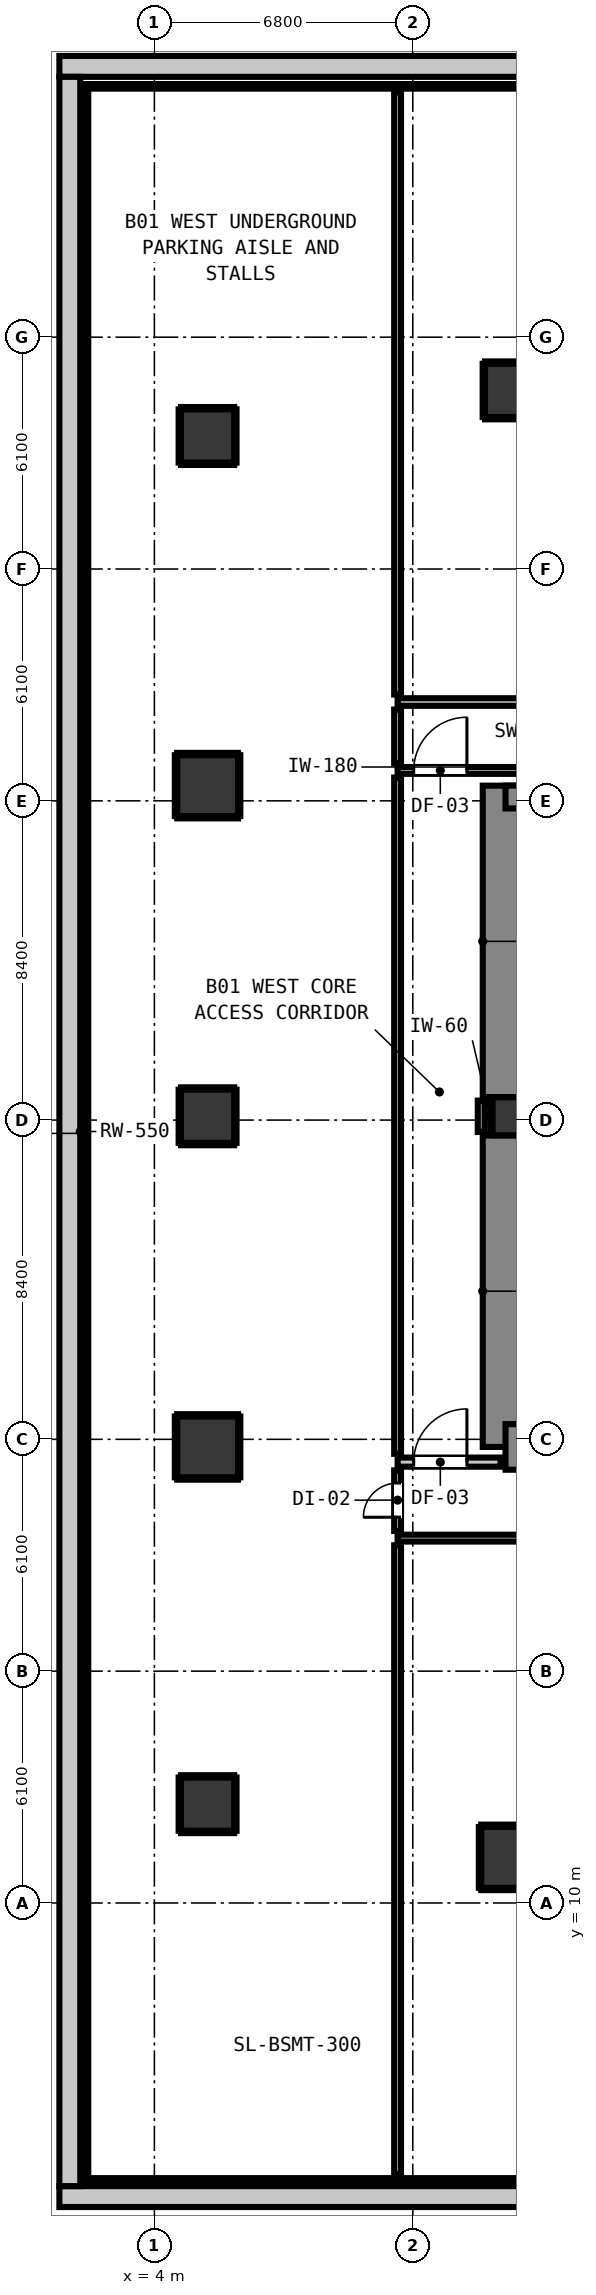
"""IFC4 building model, lengths in metres.
Left out: names, types, materials, properties, quantities, classifications, styles, units other than length and angle.
Written with IfcOpenShell. Run it as: python <this file> out.ifc"""

import sys

from ifc_helpers import new_model, si_unit, direction, frame, frame_2d, origin, origin_2d, place, context, subcontext, project, spatial, rectangle, extrude, element, fill, save


model = new_model("IFC4")
c1 = context("Model", 3, precision=1e-05, world=origin(), true_north=direction((0.0, 1.0)))
c2 = subcontext(c1, "Body", "Model", "MODEL_VIEW")
j1 = project(units=[si_unit("LENGTHUNIT", "METRE"), si_unit("PLANEANGLEUNIT", "RADIAN")], contexts=[c1])
p1 = place(None, origin())
s1 = spatial("IfcSite", under=j1, at=p1, CompositionType="ELEMENT")
p2 = place(p1, origin())
s2 = spatial("IfcBuilding", under=s1, at=p2, CompositionType="ELEMENT")
p3 = place(p2, frame((0.0, 0.0, -4.4)))
s3 = spatial("IfcBuildingStorey", under=s2, at=p3, CompositionType="ELEMENT", Elevation=-4.4)
for number, where, z_axis, x_axis in (
    (1, (1.5, 2.275, 0.0), (0.0, 0.0, 1.0), (1.0, 0.0, 0.0)),
    (2, (85.0, 58.325, 0.0), (0.0, 0.0, 1.0), (-1.0, 0.0, 0.0)),
):
    element("IfcWall", number, at=place(p3, frame(where, z_axis=z_axis, x_axis=x_axis)), inside=s3, PredefinedType="SOLIDWALL", context=c2, shape_type="SweptSolid", body=[
        extrude(rectangle(XDim=83.5, YDim=0.55, at=frame_2d((41.75, 0.0))), origin(), (0.0, 0.0, 1.0), 4.4),
    ])
p4 = place(p3, frame((1.775, 58.05, 0.0), z_axis=(0.0, 0.0, 1.0), x_axis=(0.0, -1.0, 0.0)))
e3 = element("IfcWall", 3, at=p4, inside=s3, PredefinedType="SOLIDWALL", context=c2, shape_type="SweptSolid", body=[
    extrude(rectangle(XDim=55.5, YDim=0.55, at=frame_2d((27.75, 0.0))), origin(), (0.0, 0.0, 1.0), 4.4),
])
p5 = place(p3, frame((13.4, 30.7, 0.0), z_axis=(0.0, 0.0, 1.0), x_axis=(1.0, 0.0, 0.0)))
e4 = element("IfcColumn", 4, at=p5, inside=s3, PredefinedType="COLUMN", context=c2, shape_type="SweptSolid", body=[
    extrude(rectangle(XDim=1.0, YDim=1.0, at=origin_2d()), origin(), (0.0, 0.0, 1.0), 4.4),
])
p6 = place(p3, frame((13.24, 22.0, 0.0), z_axis=(0.0, 0.0, 1.0), x_axis=(0.0, 1.0, 0.0)))
e5 = element("IfcWall", 5, at=p6, inside=s3, PredefinedType="SHEAR", context=c2, shape_type="SweptSolid", body=[
    extrude(rectangle(XDim=8.195, YDim=1.2, at=frame_2d((4.098, 0.0))), origin(), (0.0, 0.0, 1.0), 4.4),
])
p7 = place(p3, frame((13.24, 31.205, 0.0), z_axis=(0.0, 0.0, 1.0), x_axis=(0.0, 1.0, 0.0)))
e6 = element("IfcWall", 6, at=p7, inside=s3, PredefinedType="SHEAR", context=c2, shape_type="SweptSolid", body=[
    extrude(rectangle(XDim=8.195, YDim=1.2, at=frame_2d((4.097, 0.0))), origin(), (0.0, 0.0, 1.0), 4.4),
])
p8 = place(p3, frame((13.24, 22.0, 0.0), z_axis=(0.0, 0.0, 1.0), x_axis=(1.0, 0.0, 0.0)))
e7 = element("IfcWall", 7, at=p8, inside=s3, PredefinedType="SHEAR", context=c2, shape_type="SweptSolid", body=[
    extrude(rectangle(XDim=4.08, YDim=1.2, at=frame_2d((2.04, 0.0))), origin(), (0.0, 0.0, 1.0), 4.4),
])
p9 = place(p3, frame((13.24, 39.1, 0.0), z_axis=(0.0, 0.0, 1.0), x_axis=(1.0, 0.0, 0.0)))
e8 = element("IfcWall", 8, at=p9, inside=s3, PredefinedType="SHEAR", context=c2, shape_type="SweptSolid", body=[
    extrude(rectangle(XDim=4.08, YDim=0.6, at=frame_2d((2.04, 0.0))), origin(), (0.0, 0.0, 1.0), 4.4),
])
p10 = place(p3, frame((13.4, 11.2, 0.0), z_axis=(0.0, 0.0, 1.0), x_axis=(1.0, 0.0, 0.0)))
e9 = element("IfcColumn", 9, at=p10, inside=s3, PredefinedType="COLUMN", context=c2, shape_type="SweptSolid", body=[
    extrude(rectangle(XDim=1.6, YDim=1.6, at=origin_2d()), origin(), (0.0, 0.0, 1.0), 4.4),
])
p11 = place(p3, frame((13.4, 49.8, 0.0), z_axis=(0.0, 0.0, 1.0), x_axis=(1.0, 0.0, 0.0)))
e10 = element("IfcColumn", 10, at=p11, inside=s3, PredefinedType="COLUMN", context=c2, shape_type="SweptSolid", body=[
    extrude(rectangle(XDim=1.4, YDim=1.4, at=origin_2d()), origin(), (0.0, 0.0, 1.0), 4.4),
])
p12 = place(p3, frame((5.4, 22.0, 0.0), z_axis=(0.0, 0.0, 1.0), x_axis=(1.0, 0.0, 0.0)))
e11 = element("IfcColumn", 11, at=p12, inside=s3, PredefinedType="COLUMN", context=c2, shape_type="SweptSolid", body=[
    extrude(rectangle(XDim=1.6, YDim=1.6, at=origin_2d()), origin(), (0.0, 0.0, 1.0), 4.4),
])
p13 = place(p3, frame((5.4, 30.7, 0.0), z_axis=(0.0, 0.0, 1.0), x_axis=(1.0, 0.0, 0.0)))
e12 = element("IfcColumn", 12, at=p13, inside=s3, PredefinedType="COLUMN", context=c2, shape_type="SweptSolid", body=[
    extrude(rectangle(XDim=1.4, YDim=1.4, at=origin_2d()), origin(), (0.0, 0.0, 1.0), 4.4),
])
p14 = place(p3, frame((5.4, 39.4, 0.0), z_axis=(0.0, 0.0, 1.0), x_axis=(1.0, 0.0, 0.0)))
e13 = element("IfcColumn", 13, at=p14, inside=s3, PredefinedType="COLUMN", context=c2, shape_type="SweptSolid", body=[
    extrude(rectangle(XDim=1.6, YDim=1.6, at=origin_2d()), origin(), (0.0, 0.0, 1.0), 4.4),
])
for number, where, z_axis, x_axis in (
    (14, (5.4, 12.6, 0.0), (0.0, 0.0, 1.0), (1.0, 0.0, 0.0)),
    (15, (5.4, 48.6, 0.0), (0.0, 0.0, 1.0), (1.0, 0.0, 0.0)),
):
    element("IfcColumn", number, at=place(p3, frame(where, z_axis=z_axis, x_axis=x_axis)), inside=s3, PredefinedType="COLUMN", context=c2, shape_type="SweptSolid", body=[
        extrude(rectangle(XDim=1.4, YDim=1.4, at=origin_2d()), origin(), (0.0, 0.0, 1.0), 4.4),
    ])
p15 = place(p3, frame((10.4, 21.6, 0.0), z_axis=(0.0, 0.0, 1.0), x_axis=(1.0, 0.0, 0.0)))
e16 = element("IfcWall", 16, at=p15, inside=s3, PredefinedType="PARTITIONING", context=c2, shape_type="SweptSolid", body=[
    extrude(rectangle(XDim=2.71, YDim=0.24, at=frame_2d((1.355, 0.0))), origin(), (0.0, 0.0, 1.0), 3.215),
])
p16 = place(p15, frame((0.424, 0.0, 0.0)))
e17 = element("IfcOpeningElement", 17, at=p16, cuts=e16, PredefinedType="OPENING", context=c2, shape_type="SweptSolid", body=[
    extrude(rectangle(XDim=1.4, YDim=2.15, at=frame_2d((0.7, 1.075))), frame((0.0, 0.13, 0.0), z_axis=(0.0, -1.0, 0.0), x_axis=(1.0, 0.0, 0.0)), (0.0, 0.0, 1.0), 0.26),
])
p17 = place(p3, frame((10.4, 41.6, 0.0), z_axis=(0.0, 0.0, 1.0), x_axis=(1.0, 0.0, 0.0)))
e18 = element("IfcWall", 18, at=p17, inside=s3, PredefinedType="PARTITIONING", context=c2, shape_type="SweptSolid", body=[
    extrude(rectangle(XDim=30.752, YDim=0.2, at=frame_2d((15.376, 0.0))), origin(), (0.0, 0.0, 1.0), 3.98),
])
p18 = place(p17, frame((16.374, 0.0, 0.0)))
e19 = element("IfcOpeningElement", 19, at=p18, cuts=e18, PredefinedType="OPENING", context=c2, shape_type="SweptSolid", body=[
    extrude(rectangle(XDim=0.9, YDim=2.1, at=frame_2d((0.45, 1.05))), frame((0.0, 0.11, 0.0), z_axis=(0.0, -1.0, 0.0), x_axis=(1.0, 0.0, 0.0)), (0.0, 0.0, 1.0), 0.22),
])
p19 = place(p3, frame((10.4, 19.6, 0.0), z_axis=(0.0, 0.0, 1.0), x_axis=(1.0, 0.0, 0.0)))
e20 = element("IfcWall", 20, at=p19, inside=s3, PredefinedType="PARTITIONING", context=c2, shape_type="SweptSolid", body=[
    extrude(rectangle(XDim=36.902, YDim=0.18, at=frame_2d((18.451, 0.0))), origin(), (0.0, 0.0, 1.0), 3.98),
])
p20 = place(p19, frame((13.274, 0.0, 0.0)))
e21 = element("IfcOpeningElement", 21, at=p20, cuts=e20, PredefinedType="OPENING", context=c2, shape_type="SweptSolid", body=[
    extrude(rectangle(XDim=0.9, YDim=2.1, at=frame_2d((0.45, 1.05))), frame((0.0, 0.1, 0.0), z_axis=(0.0, -1.0, 0.0), x_axis=(1.0, 0.0, 0.0)), (0.0, 0.0, 1.0), 0.2),
])
p21 = place(p19, frame((32.576, 0.0, 0.0)))
e22 = element("IfcOpeningElement", 22, at=p21, cuts=e20, PredefinedType="OPENING", context=c2, shape_type="SweptSolid", body=[
    extrude(rectangle(XDim=0.9, YDim=2.1, at=frame_2d((0.45, 1.05))), frame((0.0, 0.1, 0.0), z_axis=(0.0, -1.0, 0.0), x_axis=(1.0, 0.0, 0.0)), (0.0, 0.0, 1.0), 0.2),
])
p22 = place(p3, frame((10.4, 39.8, 0.0), z_axis=(0.0, 0.0, 1.0), x_axis=(1.0, 0.0, 0.0)))
e23 = element("IfcWall", 23, at=p22, inside=s3, PredefinedType="PARTITIONING", context=c2, shape_type="SweptSolid", body=[
    extrude(rectangle(XDim=9.798, YDim=0.18, at=frame_2d((4.899, 0.0))), origin(), (0.0, 0.0, 1.0), 3.215),
])
p23 = place(p22, frame((7.035, 0.0, 0.0)))
e24 = element("IfcOpeningElement", 24, at=p23, cuts=e23, PredefinedType="OPENING", context=c2, shape_type="SweptSolid", body=[
    extrude(rectangle(XDim=1.4, YDim=2.15, at=frame_2d((0.7, 1.075))), frame((0.0, 0.1, 0.0), z_axis=(0.0, -1.0, 0.0), x_axis=(1.0, 0.0, 0.0)), (0.0, 0.0, 1.0), 0.2),
])
p24 = place(p22, frame((0.424, 0.0, 0.0)))
e25 = element("IfcOpeningElement", 25, at=p24, cuts=e23, PredefinedType="OPENING", context=c2, shape_type="SweptSolid", body=[
    extrude(rectangle(XDim=1.4, YDim=2.15, at=frame_2d((0.7, 1.075))), frame((0.0, 0.1, 0.0), z_axis=(0.0, -1.0, 0.0), x_axis=(1.0, 0.0, 0.0)), (0.0, 0.0, 1.0), 0.2),
])
p25 = place(p3, frame((2.2, 2.7, 0.0), z_axis=(0.0, 0.0, 1.0), x_axis=(1.0, 0.0, 0.0)))
e26 = element("IfcWall", 26, at=p25, inside=s3, PredefinedType="PARTITIONING", context=c2, shape_type="SweptSolid", body=[
    extrude(rectangle(XDim=35.6, YDim=0.12, at=frame_2d((17.8, 0.0))), origin(), (0.0, 0.0, 1.0), 3.98),
])
p26 = place(p3, frame((2.2, 57.8, 0.0), z_axis=(0.0, 0.0, 1.0), x_axis=(1.0, 0.0, 0.0)))
e27 = element("IfcWall", 27, at=p26, inside=s3, PredefinedType="PARTITIONING", context=c2, shape_type="SweptSolid", body=[
    extrude(rectangle(XDim=41.8, YDim=0.12, at=frame_2d((20.9, 0.0))), origin(), (0.0, 0.0, 1.0), 3.98),
])
p27 = place(p3, frame((10.4, 2.858, 0.0), z_axis=(0.0, 0.0, 1.0), x_axis=(0.0, 1.0, 0.0)))
e28 = element("IfcWall", 28, at=p27, inside=s3, PredefinedType="PARTITIONING", context=c2, shape_type="SweptSolid", body=[
    extrude(rectangle(XDim=16.554, YDim=0.18, at=frame_2d((8.277, 0.0))), origin(), (0.0, 0.0, 1.0), 3.98),
])
p28 = place(p3, frame((10.4, 19.788, 0.0), z_axis=(0.0, 0.0, 1.0), x_axis=(0.0, 1.0, 0.0)))
e29 = element("IfcWall", 29, at=p28, inside=s3, PredefinedType="PARTITIONING", context=c2, shape_type="SweptSolid", body=[
    extrude(rectangle(XDim=1.594, YDim=0.18, at=frame_2d((0.797, 0.0))), origin(), (0.0, 0.0, 1.0), 3.98),
])
p29 = place(p28, frame((0.362, 0.0, 0.0)))
e30 = element("IfcOpeningElement", 30, at=p29, cuts=e29, PredefinedType="OPENING", context=c2, shape_type="SweptSolid", body=[
    extrude(rectangle(XDim=0.9, YDim=2.1, at=frame_2d((0.45, 1.05))), frame((0.0, 0.1, 0.0), z_axis=(0.0, -1.0, 0.0), x_axis=(1.0, 0.0, 0.0)), (0.0, 0.0, 1.0), 0.2),
])
p30 = place(p3, frame((10.4, 21.818, 0.0), z_axis=(0.0, 0.0, 1.0), x_axis=(0.0, 1.0, 0.0)))
e31 = element("IfcWall", 31, at=p30, inside=s3, PredefinedType="PARTITIONING", context=c2, shape_type="SweptSolid", body=[
    extrude(rectangle(XDim=17.794, YDim=0.18, at=frame_2d((8.897, 0.0))), origin(), (0.0, 0.0, 1.0), 3.98),
])
p31 = place(p3, frame((10.4, 39.988, 0.0), z_axis=(0.0, 0.0, 1.0), x_axis=(0.0, 1.0, 0.0)))
e32 = element("IfcWall", 32, at=p31, inside=s3, PredefinedType="PARTITIONING", context=c2, shape_type="SweptSolid", body=[
    extrude(rectangle(XDim=1.414, YDim=0.18, at=frame_2d((0.707, 0.0))), origin(), (0.0, 0.0, 1.0), 3.98),
])
p32 = place(p3, frame((10.4, 41.798, 0.0), z_axis=(0.0, 0.0, 1.0), x_axis=(0.0, 1.0, 0.0)))
e33 = element("IfcWall", 33, at=p32, inside=s3, PredefinedType="PARTITIONING", context=c2, shape_type="SweptSolid", body=[
    extrude(rectangle(XDim=15.844, YDim=0.18, at=frame_2d((7.922, 0.0))), origin(), (0.0, 0.0, 1.0), 3.98),
])
p33 = place(p3, frame((12.6, 30.287, 0.0), z_axis=(0.0, 0.0, 1.0), x_axis=(0.0, 1.0, 0.0)))
e34 = element("IfcWall", 34, at=p33, inside=s3, PredefinedType="PARTITIONING", context=c2, shape_type="SweptSolid", body=[
    extrude(rectangle(XDim=0.826, YDim=0.18, at=frame_2d((0.413, 0.0))), origin(), (0.0, 0.0, 1.0), 3.98),
])
p34 = place(p3, frame((2.2, 2.828, 0.0), z_axis=(0.0, 0.0, 1.0), x_axis=(0.0, 1.0, 0.0)))
e35 = element("IfcWall", 35, at=p34, inside=s3, PredefinedType="PARTITIONING", context=c2, shape_type="SweptSolid", body=[
    extrude(rectangle(XDim=54.844, YDim=0.12, at=frame_2d((27.422, 0.0))), origin(), (0.0, 0.0, 1.0), 3.98),
])
p35 = place(p3, frame((12.868, 30.21, 0.0), z_axis=(0.0, 0.0, 1.0), x_axis=(0.0, 1.0, 0.0)))
e36 = element("IfcWall", 36, at=p35, inside=s3, PredefinedType="PARTITIONING", context=c2, shape_type="SweptSolid", body=[
    extrude(rectangle(XDim=0.98, YDim=0.06, at=frame_2d((0.49, 0.0))), origin(), (0.0, 0.0, 1.0), 1.45),
])
for number, where, z_axis, x_axis in (
    (37, (12.6, 10.368, 0.0), (0.0, 0.0, 1.0), (1.0, 0.0, 0.0)),
    (38, (12.6, 12.032, 0.0), (0.0, 0.0, 1.0), (1.0, 0.0, 0.0)),
):
    element("IfcWall", number, at=place(p3, frame(where, z_axis=z_axis, x_axis=x_axis)), inside=s3, PredefinedType="PARTITIONING", context=c2, shape_type="SweptSolid", body=[
        extrude(rectangle(XDim=1.6, YDim=0.06, at=frame_2d((0.8, 0.0))), origin(), (0.0, 0.0, 1.0), 1.45),
    ])
p36 = place(p3, frame((12.568, 10.4, 0.0), z_axis=(0.0, 0.0, 1.0), x_axis=(0.0, 1.0, 0.0)))
e39 = element("IfcWall", 39, at=p36, inside=s3, PredefinedType="PARTITIONING", context=c2, shape_type="SweptSolid", body=[
    extrude(rectangle(XDim=1.6, YDim=0.06, at=frame_2d((0.8, 0.0))), origin(), (0.0, 0.0, 1.0), 1.45),
])
for number, where, z_axis, x_axis in (
    (40, (12.7, 49.068, 0.0), (0.0, 0.0, 1.0), (1.0, 0.0, 0.0)),
    (41, (12.7, 50.532, 0.0), (0.0, 0.0, 1.0), (1.0, 0.0, 0.0)),
):
    element("IfcWall", number, at=place(p3, frame(where, z_axis=z_axis, x_axis=x_axis)), inside=s3, PredefinedType="PARTITIONING", context=c2, shape_type="SweptSolid", body=[
        extrude(rectangle(XDim=1.4, YDim=0.06, at=frame_2d((0.7, 0.0))), origin(), (0.0, 0.0, 1.0), 1.45),
    ])
p37 = place(p3, frame((12.668, 49.1, 0.0), z_axis=(0.0, 0.0, 1.0), x_axis=(0.0, 1.0, 0.0)))
e42 = element("IfcWall", 42, at=p37, inside=s3, PredefinedType="PARTITIONING", context=c2, shape_type="SweptSolid", body=[
    extrude(rectangle(XDim=1.4, YDim=0.06, at=frame_2d((0.7, 0.0))), origin(), (0.0, 0.0, 1.0), 1.45),
])
for number, where, z_axis, x_axis in (
    (43, (4.6, 21.168, 0.0), (0.0, 0.0, 1.0), (1.0, 0.0, 0.0)),
    (44, (4.6, 22.832, 0.0), (0.0, 0.0, 1.0), (1.0, 0.0, 0.0)),
):
    element("IfcWall", number, at=place(p3, frame(where, z_axis=z_axis, x_axis=x_axis)), inside=s3, PredefinedType="PARTITIONING", context=c2, shape_type="SweptSolid", body=[
        extrude(rectangle(XDim=1.6, YDim=0.06, at=frame_2d((0.8, 0.0))), origin(), (0.0, 0.0, 1.0), 1.45),
    ])
for number, where, z_axis, x_axis in (
    (45, (4.568, 21.2, 0.0), (0.0, 0.0, 1.0), (0.0, 1.0, 0.0)),
    (46, (6.232, 21.2, 0.0), (0.0, 0.0, 1.0), (0.0, 1.0, 0.0)),
):
    element("IfcWall", number, at=place(p3, frame(where, z_axis=z_axis, x_axis=x_axis)), inside=s3, PredefinedType="PARTITIONING", context=c2, shape_type="SweptSolid", body=[
        extrude(rectangle(XDim=1.6, YDim=0.06, at=frame_2d((0.8, 0.0))), origin(), (0.0, 0.0, 1.0), 1.45),
    ])
for number, where, z_axis, x_axis in (
    (47, (4.7, 29.968, 0.0), (0.0, 0.0, 1.0), (1.0, 0.0, 0.0)),
    (48, (4.7, 31.432, 0.0), (0.0, 0.0, 1.0), (1.0, 0.0, 0.0)),
):
    element("IfcWall", number, at=place(p3, frame(where, z_axis=z_axis, x_axis=x_axis)), inside=s3, PredefinedType="PARTITIONING", context=c2, shape_type="SweptSolid", body=[
        extrude(rectangle(XDim=1.4, YDim=0.06, at=frame_2d((0.7, 0.0))), origin(), (0.0, 0.0, 1.0), 1.45),
    ])
for number, where, z_axis, x_axis in (
    (49, (4.668, 30.0, 0.0), (0.0, 0.0, 1.0), (0.0, 1.0, 0.0)),
    (50, (6.132, 30.0, 0.0), (0.0, 0.0, 1.0), (0.0, 1.0, 0.0)),
):
    element("IfcWall", number, at=place(p3, frame(where, z_axis=z_axis, x_axis=x_axis)), inside=s3, PredefinedType="PARTITIONING", context=c2, shape_type="SweptSolid", body=[
        extrude(rectangle(XDim=1.4, YDim=0.06, at=frame_2d((0.7, 0.0))), origin(), (0.0, 0.0, 1.0), 1.45),
    ])
for number, where, z_axis, x_axis in (
    (51, (4.6, 38.568, 0.0), (0.0, 0.0, 1.0), (1.0, 0.0, 0.0)),
    (52, (4.6, 40.232, 0.0), (0.0, 0.0, 1.0), (1.0, 0.0, 0.0)),
    (53, (4.568, 38.6, 0.0), (0.0, 0.0, 1.0), (0.0, 1.0, 0.0)),
    (54, (6.232, 38.6, 0.0), (0.0, 0.0, 1.0), (0.0, 1.0, 0.0)),
):
    element("IfcWall", number, at=place(p3, frame(where, z_axis=z_axis, x_axis=x_axis)), inside=s3, PredefinedType="PARTITIONING", context=c2, shape_type="SweptSolid", body=[
        extrude(rectangle(XDim=1.6, YDim=0.06, at=frame_2d((0.8, 0.0))), origin(), (0.0, 0.0, 1.0), 1.45),
    ])
for number, where, z_axis, x_axis in (
    (55, (4.7, 11.868, 0.0), (0.0, 0.0, 1.0), (1.0, 0.0, 0.0)),
    (56, (4.7, 13.332, 0.0), (0.0, 0.0, 1.0), (1.0, 0.0, 0.0)),
    (57, (4.668, 11.9, 0.0), (0.0, 0.0, 1.0), (0.0, 1.0, 0.0)),
    (58, (6.132, 11.9, 0.0), (0.0, 0.0, 1.0), (0.0, 1.0, 0.0)),
    (59, (4.7, 47.868, 0.0), (0.0, 0.0, 1.0), (1.0, 0.0, 0.0)),
    (60, (4.7, 49.332, 0.0), (0.0, 0.0, 1.0), (1.0, 0.0, 0.0)),
    (61, (4.668, 47.9, 0.0), (0.0, 0.0, 1.0), (0.0, 1.0, 0.0)),
    (62, (6.132, 47.9, 0.0), (0.0, 0.0, 1.0), (0.0, 1.0, 0.0)),
):
    element("IfcWall", number, at=place(p3, frame(where, z_axis=z_axis, x_axis=x_axis)), inside=s3, PredefinedType="PARTITIONING", context=c2, shape_type="SweptSolid", body=[
        extrude(rectangle(XDim=1.4, YDim=0.06, at=frame_2d((0.7, 0.0))), origin(), (0.0, 0.0, 1.0), 1.45),
    ])
p38 = place(p16, origin())
e63 = element("IfcDoor", 63, at=p38, inside=s3, OperationType="SINGLE_SWING_RIGHT", PredefinedType="DOOR", context=c2, shape_type="SweptSolid", body=[
    extrude(rectangle(XDim=1.4, YDim=2.15, at=frame_2d((0.7, 1.075))), frame((0.0, 0.025, 0.0), z_axis=(0.0, -1.0, 0.0), x_axis=(1.0, 0.0, 0.0)), (0.0, 0.0, 1.0), 0.05),
])
fill(e17, e63)
p39 = place(p24, origin())
e64 = element("IfcDoor", 64, at=p39, inside=s3, OperationType="SINGLE_SWING_RIGHT", PredefinedType="DOOR", context=c2, shape_type="SweptSolid", body=[
    extrude(rectangle(XDim=1.4, YDim=2.15, at=frame_2d((0.7, 1.075))), frame((0.0, 0.025, 0.0), z_axis=(0.0, -1.0, 0.0), x_axis=(1.0, 0.0, 0.0)), (0.0, 0.0, 1.0), 0.05),
])
fill(e25, e64)
p40 = place(p29, origin())
e65 = element("IfcDoor", 65, at=p40, inside=s3, OperationType="SINGLE_SWING_LEFT", PredefinedType="DOOR", context=c2, shape_type="SweptSolid", body=[
    extrude(rectangle(XDim=0.9, YDim=2.1, at=frame_2d((0.45, 1.05))), frame((0.0, 0.025, 0.0), z_axis=(0.0, -1.0, 0.0), x_axis=(1.0, 0.0, 0.0)), (0.0, 0.0, 1.0), 0.05),
])
fill(e30, e65)
save(model, sys.argv[1])
